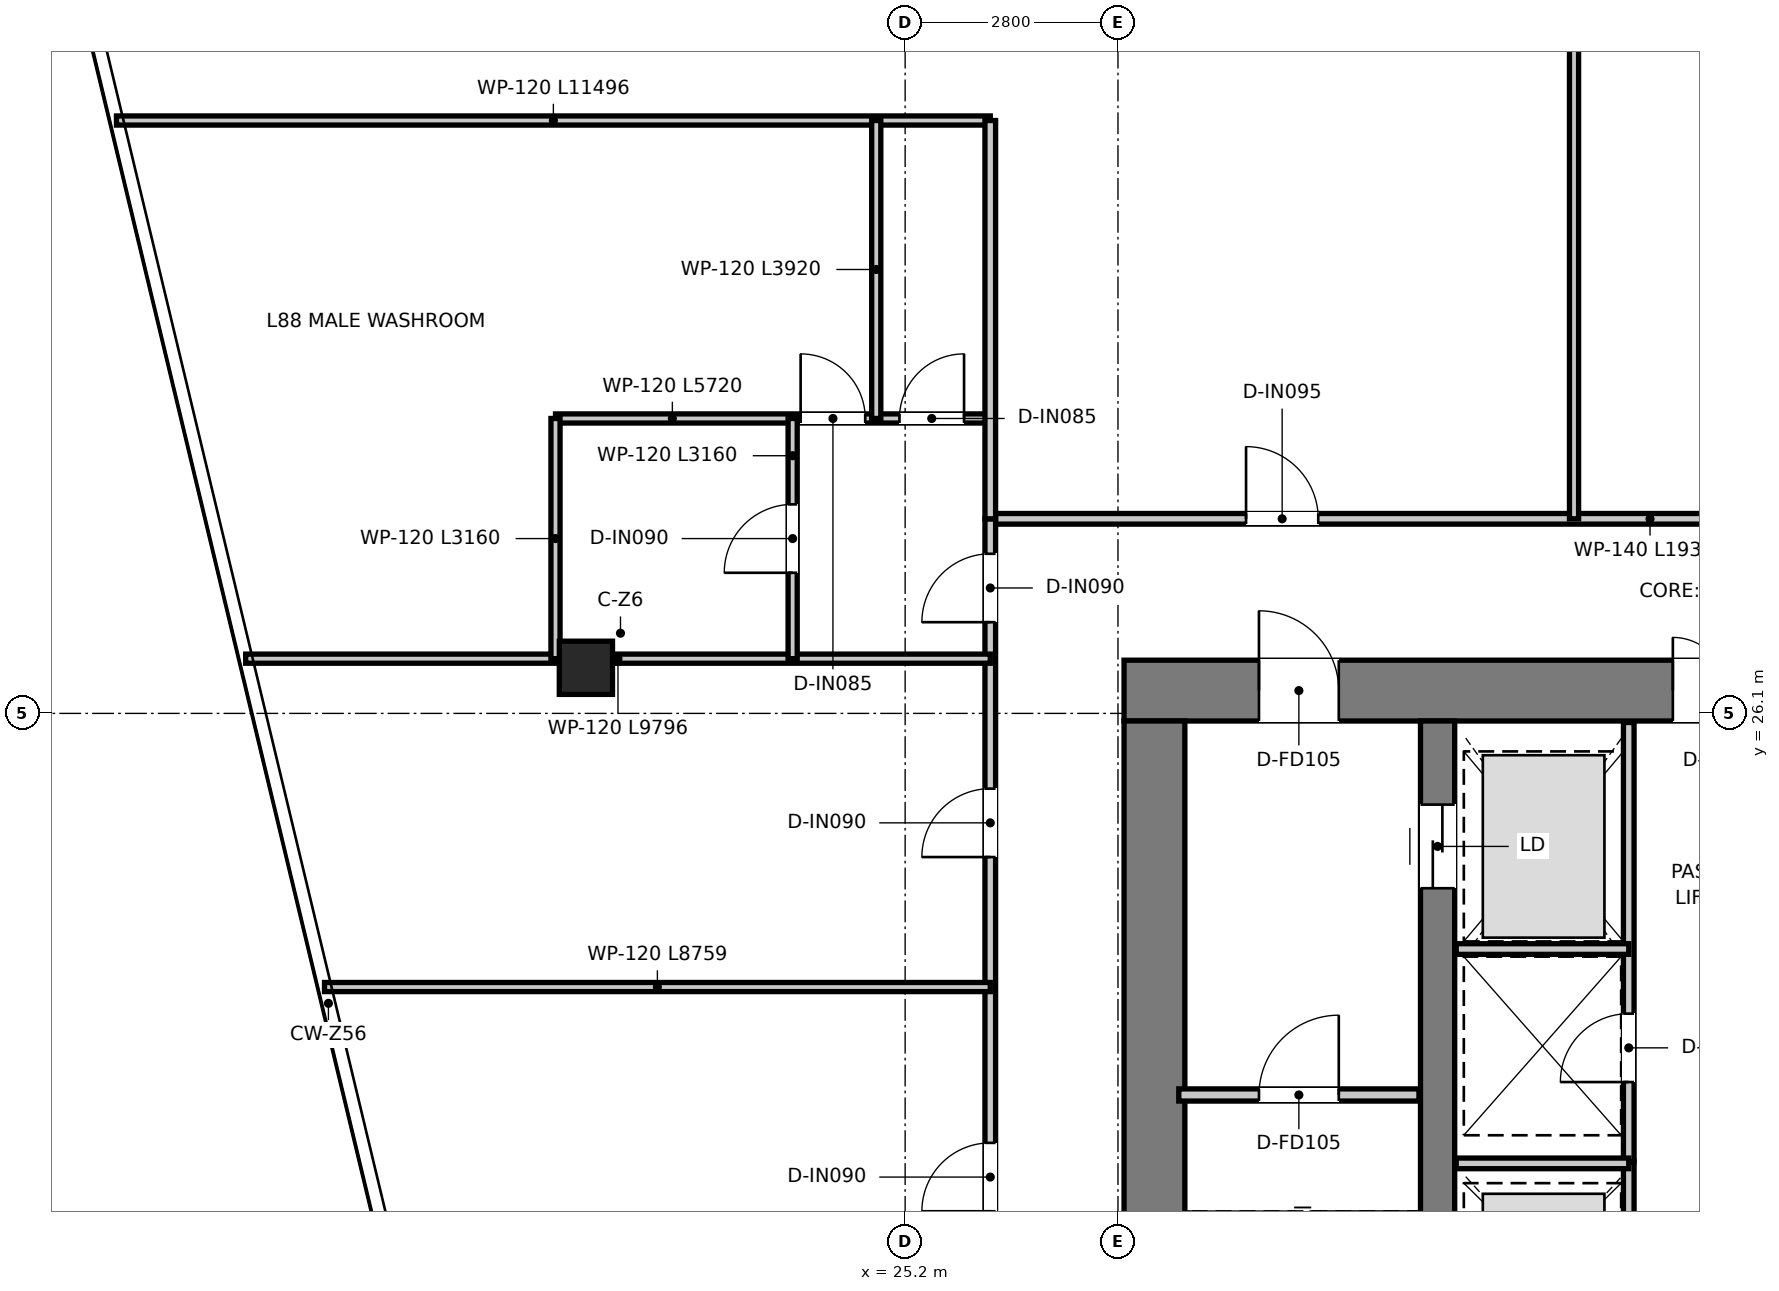
"""IFC4 building model, lengths in metres.
Left out: names, types, materials, properties, quantities, classifications, styles, units other than length and angle.
Written with IfcOpenShell. Run it as: python <this file> out.ifc"""

import sys

from ifc_helpers import new_model, si_unit, direction, frame, frame_2d, origin, origin_2d, place, context, subcontext, project, spatial, rectangle, extrude, source, transform, mapped, element, fill, save


model = new_model("IFC4")
c1 = context("Model", 3, precision=1e-05, world=origin(), true_north=direction((0.0, 1.0)))
c2 = subcontext(c1, "Body", "Model", "MODEL_VIEW")
j1 = project(units=[si_unit("LENGTHUNIT", "METRE"), si_unit("PLANEANGLEUNIT", "RADIAN")], contexts=[c1])
p1 = place(None, origin())
s1 = spatial("IfcSite", under=j1, at=p1, CompositionType="ELEMENT")
p2 = place(p1, origin())
s2 = spatial("IfcBuilding", under=s1, at=p2, CompositionType="ELEMENT")
p3 = place(p2, frame((0.0, 0.0, 359.3)))
s3 = spatial("IfcBuildingStorey", under=s2, at=p3, CompositionType="ELEMENT", Elevation=359.3)
p4 = place(p3, frame((28.08, 26.4, 0.0), z_axis=(0.0, 0.0, 1.0), x_axis=(1.0, 0.0, 0.0)))
e1 = element("IfcWall", 1, at=p4, inside=s3, PredefinedType="SHEAR", context=c2, shape_type="SweptSolid", body=[
    extrude(rectangle(XDim=15.84, YDim=0.8, at=frame_2d((7.92, 0.0))), origin(), (0.0, 0.0, 1.0), 3.95),
])
p5 = place(p4, frame((7.22, 0.0, 0.0)))
e2 = element("IfcOpeningElement", 2, at=p5, cuts=e1, PredefinedType="OPENING", context=c2, shape_type="SweptSolid", body=[
    extrude(rectangle(XDim=1.4, YDim=2.2, at=frame_2d((0.7, 1.1))), frame((0.0, 0.41, 0.0), z_axis=(0.0, -1.0, 0.0), x_axis=(1.0, 0.0, 0.0)), (0.0, 0.0, 1.0), 0.82),
])
p6 = place(p4, frame((1.775, 0.0, 0.0)))
e3 = element("IfcOpeningElement", 3, at=p6, cuts=e1, PredefinedType="OPENING", context=c2, shape_type="SweptSolid", body=[
    extrude(rectangle(XDim=1.05, YDim=2.1, at=frame_2d((0.525, 1.05))), frame((0.0, 0.41, 0.0), z_axis=(0.0, -1.0, 0.0), x_axis=(1.0, 0.0, 0.0)), (0.0, 0.0, 1.0), 0.82),
])
p7 = place(p4, frame((13.015, 0.0, 0.0)))
e4 = element("IfcOpeningElement", 4, at=p7, cuts=e1, PredefinedType="OPENING", context=c2, shape_type="SweptSolid", body=[
    extrude(rectangle(XDim=1.05, YDim=2.1, at=frame_2d((0.525, 1.05))), frame((0.0, 0.41, 0.0), z_axis=(0.0, -1.0, 0.0), x_axis=(1.0, 0.0, 0.0)), (0.0, 0.0, 1.0), 0.82),
])
p8 = place(p3, frame((28.48, 11.3, 0.0), z_axis=(0.0, 0.0, 1.0), x_axis=(0.0, 1.0, 0.0)))
e5 = element("IfcWall", 5, at=p8, inside=s3, PredefinedType="SHEAR", context=c2, shape_type="SweptSolid", body=[
    extrude(rectangle(XDim=14.7, YDim=0.8, at=frame_2d((7.35, 0.0))), origin(), (0.0, 0.0, 1.0), 3.95),
])
p9 = place(p3, frame((32.205, 13.22, 0.0), z_axis=(0.0, 0.0, 1.0), x_axis=(0.0, 1.0, 0.0)))
e6 = element("IfcWall", 6, at=p9, inside=s3, PredefinedType="SHEAR", context=c2, shape_type="SweptSolid", body=[
    extrude(rectangle(XDim=12.78, YDim=0.45, at=frame_2d((6.39, 0.0))), origin(), (0.0, 0.0, 1.0), 3.95),
])
p10 = place(p9, frame((10.58, 0.0, 0.0)))
e7 = element("IfcOpeningElement", 7, at=p10, cuts=e6, PredefinedType="OPENING", context=c2, shape_type="SweptSolid", body=[
    extrude(rectangle(XDim=1.1, YDim=2.15, at=frame_2d((0.55, 1.075))), frame((0.0, 0.235, 0.0), z_axis=(0.0, -1.0, 0.0), x_axis=(1.0, 0.0, 0.0)), (0.0, 0.0, 1.0), 0.47),
])
m1 = source(origin(), c2, "Body", "SweptSolid", [
    extrude(rectangle(XDim=0.7, YDim=0.7, at=origin_2d()), origin(), (0.0, 0.0, 1.0), 3.95),
])
p11 = place(p3, frame((21.0, 26.7, 0.0), z_axis=(0.0, 0.0, 1.0), x_axis=(1.0, 0.0, 0.0)))
e8 = element("IfcColumn", 8, at=p11, inside=s3, PredefinedType="COLUMN", context=c2, shape_type="MappedRepresentation", body=[
    mapped(m1, transform((0.0, 0.0, 0.0), x_axis=(1.0, 0.0, 0.0), y_axis=(0.0, 1.0, 0.0), z_axis=(0.0, 0.0, 1.0), scale=1.0)),
])
p12 = place(p3, frame((28.8, 21.08, 0.0), z_axis=(0.0, 0.0, 1.0), x_axis=(1.0, 0.0, 0.0)))
e9 = element("IfcWall", 9, at=p12, inside=s3, PredefinedType="PARTITIONING", context=c2, shape_type="SweptSolid", body=[
    extrude(rectangle(XDim=3.16, YDim=0.16, at=frame_2d((1.58, 0.0))), origin(), (0.0, 0.0, 1.0), 3.6),
])
p13 = place(p12, frame((1.055, 0.0, 0.0)))
e10 = element("IfcOpeningElement", 10, at=p13, cuts=e9, PredefinedType="OPENING", context=c2, shape_type="SweptSolid", body=[
    extrude(rectangle(XDim=1.05, YDim=2.1, at=frame_2d((0.525, 1.05))), frame((0.0, 0.09, 0.0), z_axis=(0.0, -1.0, 0.0), x_axis=(1.0, 0.0, 0.0)), (0.0, 0.0, 1.0), 0.18),
])
p14 = place(p3, frame((34.72, 20.2, 0.0), z_axis=(0.0, 0.0, 1.0), x_axis=(0.0, 1.0, 0.0)))
e11 = element("IfcWall", 11, at=p14, inside=s3, PredefinedType="PARTITIONING", context=c2, shape_type="SweptSolid", body=[
    extrude(rectangle(XDim=5.78, YDim=0.14, at=frame_2d((2.89, 0.0))), origin(), (0.0, 0.0, 1.0), 2.75),
])
p15 = place(p14, frame((1.05, 0.0, 0.0)))
e12 = element("IfcOpeningElement", 12, at=p15, cuts=e11, PredefinedType="OPENING", context=c2, shape_type="SweptSolid", body=[
    extrude(rectangle(XDim=0.9, YDim=2.1, at=frame_2d((0.45, 1.05))), frame((0.0, 0.08, 0.0), z_axis=(0.0, -1.0, 0.0), x_axis=(1.0, 0.0, 0.0)), (0.0, 0.0, 1.0), 0.16),
])
p16 = place(p3, frame((32.45, 23.0, 0.0), z_axis=(0.0, 0.0, 1.0), x_axis=(1.0, 0.0, 0.0)))
e13 = element("IfcWall", 13, at=p16, inside=s3, PredefinedType="PARTITIONING", context=c2, shape_type="SweptSolid", body=[
    extrude(rectangle(XDim=2.27, YDim=0.14, at=frame_2d((1.135, 0.0))), origin(), (0.0, 0.0, 1.0), 2.75),
])
p17 = place(p3, frame((34.72, 17.78, 0.0), z_axis=(0.0, 0.0, 1.0), x_axis=(0.0, 1.0, 0.0)))
e14 = element("IfcWall", 14, at=p17, inside=s3, PredefinedType="PARTITIONING", context=c2, shape_type="SweptSolid", body=[
    extrude(rectangle(XDim=2.42, YDim=0.14, at=frame_2d((1.21, 0.0))), origin(), (0.0, 0.0, 1.0), 3.6),
])
p18 = place(p17, frame((0.55, 0.0, 0.0)))
e15 = element("IfcOpeningElement", 15, at=p18, cuts=e14, PredefinedType="OPENING", context=c2, shape_type="SweptSolid", body=[
    extrude(rectangle(XDim=1.1, YDim=2.15, at=frame_2d((0.55, 1.075))), frame((0.0, 0.08, 0.0), z_axis=(0.0, -1.0, 0.0), x_axis=(1.0, 0.0, 0.0)), (0.0, 0.0, 1.0), 0.16),
])
p19 = place(p3, frame((32.45, 20.18, 0.0), z_axis=(0.0, 0.0, 1.0), x_axis=(1.0, 0.0, 0.0)))
e16 = element("IfcWall", 16, at=p19, inside=s3, PredefinedType="PARTITIONING", context=c2, shape_type="SweptSolid", body=[
    extrude(rectangle(XDim=2.27, YDim=0.14, at=frame_2d((1.135, 0.0))), origin(), (0.0, 0.0, 1.0), 3.6),
])
p20 = place(p3, frame((26.32, 28.66, 0.0), z_axis=(0.0, 0.0, 1.0), x_axis=(1.0, 0.0, 0.0)))
e17 = element("IfcWall", 17, at=p20, inside=s3, PredefinedType="PARTITIONING", context=c2, shape_type="SweptSolid", body=[
    extrude(rectangle(XDim=19.36, YDim=0.14, at=frame_2d((9.68, 0.0))), origin(), (0.0, 0.0, 1.0), 3.11),
])
p21 = place(p20, frame((3.365, 0.0, 0.0)))
e18 = element("IfcOpeningElement", 18, at=p21, cuts=e17, PredefinedType="OPENING", context=c2, shape_type="SweptSolid", body=[
    extrude(rectangle(XDim=0.95, YDim=2.1, at=frame_2d((0.475, 1.05))), frame((0.0, 0.08, 0.0), z_axis=(0.0, -1.0, 0.0), x_axis=(1.0, 0.0, 0.0)), (0.0, 0.0, 1.0), 0.16),
])
p22 = place(p20, frame((13.045, 0.0, 0.0)))
e19 = element("IfcOpeningElement", 19, at=p22, cuts=e17, PredefinedType="OPENING", context=c2, shape_type="SweptSolid", body=[
    extrude(rectangle(XDim=0.95, YDim=2.1, at=frame_2d((0.475, 1.05))), frame((0.0, 0.08, 0.0), z_axis=(0.0, -1.0, 0.0), x_axis=(1.0, 0.0, 0.0)), (0.0, 0.0, 1.0), 0.16),
])
p23 = place(p3, frame((26.32, 13.0, 0.0), z_axis=(0.0, 0.0, 1.0), x_axis=(0.0, 1.0, 0.0)))
e20 = element("IfcWall", 20, at=p23, inside=s3, PredefinedType="PARTITIONING", context=c2, shape_type="SweptSolid", body=[
    extrude(rectangle(XDim=15.66, YDim=0.14, at=frame_2d((7.83, 0.0))), origin(), (0.0, 0.0, 1.0), 3.06),
])
p24 = place(p23, frame((14.3, 0.0, 0.0)))
e21 = element("IfcOpeningElement", 21, at=p24, cuts=e20, PredefinedType="OPENING", context=c2, shape_type="SweptSolid", body=[
    extrude(rectangle(XDim=0.9, YDim=2.1, at=frame_2d((0.45, 1.05))), frame((0.0, 0.08, 0.0), z_axis=(0.0, -1.0, 0.0), x_axis=(1.0, 0.0, 0.0)), (0.0, 0.0, 1.0), 0.16),
])
p25 = place(p23, frame((6.55, 0.0, 0.0)))
e22 = element("IfcOpeningElement", 22, at=p25, cuts=e20, PredefinedType="OPENING", context=c2, shape_type="SweptSolid", body=[
    extrude(rectangle(XDim=0.9, YDim=2.1, at=frame_2d((0.45, 1.05))), frame((0.0, 0.08, 0.0), z_axis=(0.0, -1.0, 0.0), x_axis=(1.0, 0.0, 0.0)), (0.0, 0.0, 1.0), 0.16),
])
p26 = place(p23, frame((11.21, 0.0, 0.0)))
e23 = element("IfcOpeningElement", 23, at=p26, cuts=e20, PredefinedType="OPENING", context=c2, shape_type="SweptSolid", body=[
    extrude(rectangle(XDim=0.9, YDim=2.1, at=frame_2d((0.45, 1.05))), frame((0.0, 0.08, 0.0), z_axis=(0.0, -1.0, 0.0), x_axis=(1.0, 0.0, 0.0)), (0.0, 0.0, 1.0), 0.16),
])
p27 = place(p3, frame((16.524, 26.82, 0.0), z_axis=(0.0, 0.0, 1.0), x_axis=(1.0, 0.0, 0.0)))
e24 = element("IfcWall", 24, at=p27, inside=s3, PredefinedType="PARTITIONING", context=c2, shape_type="SweptSolid", body=[
    extrude(rectangle(XDim=9.796, YDim=0.12, at=frame_2d((4.898, 0.0))), origin(), (0.0, 0.0, 1.0), 3.06),
])
p28 = place(p3, frame((14.824, 33.9, 0.0), z_axis=(0.0, 0.0, 1.0), x_axis=(1.0, 0.0, 0.0)))
e25 = element("IfcWall", 25, at=p28, inside=s3, PredefinedType="PARTITIONING", context=c2, shape_type="SweptSolid", body=[
    extrude(rectangle(XDim=11.496, YDim=0.12, at=frame_2d((5.748, 0.0))), origin(), (0.0, 0.0, 1.0), 3.06),
])
p29 = place(p3, frame((20.6, 29.98, 0.0), z_axis=(0.0, 0.0, 1.0), x_axis=(1.0, 0.0, 0.0)))
e26 = element("IfcWall", 26, at=p29, inside=s3, PredefinedType="PARTITIONING", context=c2, shape_type="SweptSolid", body=[
    extrude(rectangle(XDim=5.72, YDim=0.12, at=frame_2d((2.86, 0.0))), origin(), (0.0, 0.0, 1.0), 3.06),
])
p30 = place(p29, frame((3.225, 0.0, 0.0)))
e27 = element("IfcOpeningElement", 27, at=p30, cuts=e26, PredefinedType="OPENING", context=c2, shape_type="SweptSolid", body=[
    extrude(rectangle(XDim=0.85, YDim=2.1, at=frame_2d((0.425, 1.05))), frame((0.0, 0.07, 0.0), z_axis=(0.0, -1.0, 0.0), x_axis=(1.0, 0.0, 0.0)), (0.0, 0.0, 1.0), 0.14),
])
p31 = place(p29, frame((4.525, 0.0, 0.0)))
e28 = element("IfcOpeningElement", 28, at=p31, cuts=e26, PredefinedType="OPENING", context=c2, shape_type="SweptSolid", body=[
    extrude(rectangle(XDim=0.85, YDim=2.1, at=frame_2d((0.425, 1.05))), frame((0.0, 0.07, 0.0), z_axis=(0.0, -1.0, 0.0), x_axis=(1.0, 0.0, 0.0)), (0.0, 0.0, 1.0), 0.14),
])
p32 = place(p3, frame((20.6, 26.82, 0.0), z_axis=(0.0, 0.0, 1.0), x_axis=(0.0, 1.0, 0.0)))
e29 = element("IfcWall", 29, at=p32, inside=s3, PredefinedType="PARTITIONING", context=c2, shape_type="SweptSolid", body=[
    extrude(rectangle(XDim=3.16, YDim=0.12, at=frame_2d((1.58, 0.0))), origin(), (0.0, 0.0, 1.0), 3.6),
])
p33 = place(p3, frame((23.72, 26.82, 0.0), z_axis=(0.0, 0.0, 1.0), x_axis=(0.0, 1.0, 0.0)))
e30 = element("IfcWall", 30, at=p33, inside=s3, PredefinedType="PARTITIONING", context=c2, shape_type="SweptSolid", body=[
    extrude(rectangle(XDim=3.16, YDim=0.12, at=frame_2d((1.58, 0.0))), origin(), (0.0, 0.0, 1.0), 3.11),
])
p34 = place(p33, frame((1.13, 0.0, 0.0)))
e31 = element("IfcOpeningElement", 31, at=p34, cuts=e30, PredefinedType="OPENING", context=c2, shape_type="SweptSolid", body=[
    extrude(rectangle(XDim=0.9, YDim=2.1, at=frame_2d((0.45, 1.05))), frame((0.0, 0.07, 0.0), z_axis=(0.0, -1.0, 0.0), x_axis=(1.0, 0.0, 0.0)), (0.0, 0.0, 1.0), 0.14),
])
p35 = place(p3, frame((24.82, 29.98, 0.0), z_axis=(0.0, 0.0, 1.0), x_axis=(0.0, 1.0, 0.0)))
e32 = element("IfcWall", 32, at=p35, inside=s3, PredefinedType="PARTITIONING", context=c2, shape_type="SweptSolid", body=[
    extrude(rectangle(XDim=3.92, YDim=0.12, at=frame_2d((1.96, 0.0))), origin(), (0.0, 0.0, 1.0), 3.3),
])
p36 = place(p3, frame((26.32, 28.66, 0.0), z_axis=(0.0, 0.0, 1.0), x_axis=(0.0, 1.0, 0.0)))
e33 = element("IfcWall", 33, at=p36, inside=s3, PredefinedType="PARTITIONING", context=c2, shape_type="SweptSolid", body=[
    extrude(rectangle(XDim=5.24, YDim=0.14, at=frame_2d((2.62, 0.0))), origin(), (0.0, 0.0, 1.0), 3.36),
])
p37 = place(p3, frame((34.0, 28.66, 0.0), z_axis=(0.0, 0.0, 1.0), x_axis=(0.0, 1.0, 0.0)))
e34 = element("IfcWall", 34, at=p37, inside=s3, PredefinedType="PARTITIONING", context=c2, shape_type="SweptSolid", body=[
    extrude(rectangle(XDim=17.007, YDim=0.12, at=frame_2d((8.504, 0.0))), origin(), (0.0, 0.0, 1.0), 3.06),
])
p38 = place(p3, frame((17.561, 22.5, 0.0), z_axis=(0.0, 0.0, 1.0), x_axis=(1.0, 0.0, 0.0)))
e35 = element("IfcWall", 35, at=p38, inside=s3, PredefinedType="PARTITIONING", context=c2, shape_type="SweptSolid", body=[
    extrude(rectangle(XDim=8.759, YDim=0.12, at=frame_2d((4.379, 0.0))), origin(), (0.0, 0.0, 1.0), 3.06),
])
p39 = place(p13, origin())
e36 = element("IfcDoor", 36, at=p39, inside=s3, OperationType="SINGLE_SWING_RIGHT", PredefinedType="DOOR", context=c2, shape_type="SweptSolid", body=[
    extrude(rectangle(XDim=1.05, YDim=2.1, at=frame_2d((0.525, 1.05))), frame((0.0, 0.025, 0.0), z_axis=(0.0, -1.0, 0.0), x_axis=(1.0, 0.0, 0.0)), (0.0, 0.0, 1.0), 0.05),
])
fill(e10, e36)
p40 = place(p5, origin())
e37 = element("IfcDoor", 37, at=p40, inside=s3, OperationType="DOUBLE_DOOR_SINGLE_SWING", PredefinedType="DOOR", context=c2, shape_type="SweptSolid", body=[
    extrude(rectangle(XDim=1.4, YDim=2.2, at=frame_2d((0.7, 1.1))), frame((0.0, 0.025, 0.0), z_axis=(0.0, -1.0, 0.0), x_axis=(1.0, 0.0, 0.0)), (0.0, 0.0, 1.0), 0.05),
])
fill(e2, e37)
p41 = place(p6, origin())
e38 = element("IfcDoor", 38, at=p41, inside=s3, OperationType="SINGLE_SWING_LEFT", PredefinedType="DOOR", context=c2, shape_type="SweptSolid", body=[
    extrude(rectangle(XDim=1.05, YDim=2.1, at=frame_2d((0.525, 1.05))), frame((0.0, 0.025, 0.0), z_axis=(0.0, -1.0, 0.0), x_axis=(1.0, 0.0, 0.0)), (0.0, 0.0, 1.0), 0.05),
])
fill(e3, e38)
p42 = place(p10, origin())
e39 = element("IfcDoor", 39, at=p42, inside=s3, OperationType="DOUBLE_DOOR_SLIDING", PredefinedType="DOOR", context=c2, shape_type="SweptSolid", body=[
    extrude(rectangle(XDim=1.1, YDim=2.15, at=frame_2d((0.55, 1.075))), frame((0.0, 0.025, 0.0), z_axis=(0.0, -1.0, 0.0), x_axis=(1.0, 0.0, 0.0)), (0.0, 0.0, 1.0), 0.05),
])
fill(e7, e39)
p43 = place(p15, origin())
e40 = element("IfcDoor", 40, at=p43, inside=s3, OperationType="SINGLE_SWING_LEFT", PredefinedType="DOOR", context=c2, shape_type="SweptSolid", body=[
    extrude(rectangle(XDim=0.9, YDim=2.1, at=frame_2d((0.45, 1.05))), frame((0.0, 0.025, 0.0), z_axis=(0.0, -1.0, 0.0), x_axis=(1.0, 0.0, 0.0)), (0.0, 0.0, 1.0), 0.05),
])
fill(e12, e40)
p44 = place(p24, origin())
e41 = element("IfcDoor", 41, at=p44, inside=s3, OperationType="SINGLE_SWING_LEFT", PredefinedType="DOOR", context=c2, shape_type="SweptSolid", body=[
    extrude(rectangle(XDim=0.9, YDim=2.1, at=frame_2d((0.45, 1.05))), frame((0.0, 0.025, 0.0), z_axis=(0.0, -1.0, 0.0), x_axis=(1.0, 0.0, 0.0)), (0.0, 0.0, 1.0), 0.05),
])
fill(e21, e41)
p45 = place(p30, origin())
e42 = element("IfcDoor", 42, at=p45, inside=s3, OperationType="SINGLE_SWING_LEFT", PredefinedType="DOOR", context=c2, shape_type="SweptSolid", body=[
    extrude(rectangle(XDim=0.85, YDim=2.1, at=frame_2d((0.425, 1.05))), frame((0.0, 0.025, 0.0), z_axis=(0.0, -1.0, 0.0), x_axis=(1.0, 0.0, 0.0)), (0.0, 0.0, 1.0), 0.05),
])
fill(e27, e42)
p46 = place(p31, origin())
e43 = element("IfcDoor", 43, at=p46, inside=s3, OperationType="SINGLE_SWING_RIGHT", PredefinedType="DOOR", context=c2, shape_type="SweptSolid", body=[
    extrude(rectangle(XDim=0.85, YDim=2.1, at=frame_2d((0.425, 1.05))), frame((0.0, 0.025, 0.0), z_axis=(0.0, -1.0, 0.0), x_axis=(1.0, 0.0, 0.0)), (0.0, 0.0, 1.0), 0.05),
])
fill(e28, e43)
p47 = place(p34, origin())
e44 = element("IfcDoor", 44, at=p47, inside=s3, OperationType="SINGLE_SWING_LEFT", PredefinedType="DOOR", context=c2, shape_type="SweptSolid", body=[
    extrude(rectangle(XDim=0.9, YDim=2.1, at=frame_2d((0.45, 1.05))), frame((0.0, 0.025, 0.0), z_axis=(0.0, -1.0, 0.0), x_axis=(1.0, 0.0, 0.0)), (0.0, 0.0, 1.0), 0.05),
])
fill(e31, e44)
p48 = place(p21, origin())
e45 = element("IfcDoor", 45, at=p48, inside=s3, OperationType="SINGLE_SWING_LEFT", PredefinedType="DOOR", context=c2, shape_type="SweptSolid", body=[
    extrude(rectangle(XDim=0.95, YDim=2.1, at=frame_2d((0.475, 1.05))), frame((0.0, 0.025, 0.0), z_axis=(0.0, -1.0, 0.0), x_axis=(1.0, 0.0, 0.0)), (0.0, 0.0, 1.0), 0.05),
])
fill(e18, e45)
p49 = place(p25, origin())
e46 = element("IfcDoor", 46, at=p49, inside=s3, OperationType="SINGLE_SWING_LEFT", PredefinedType="DOOR", context=c2, shape_type="SweptSolid", body=[
    extrude(rectangle(XDim=0.9, YDim=2.1, at=frame_2d((0.45, 1.05))), frame((0.0, 0.025, 0.0), z_axis=(0.0, -1.0, 0.0), x_axis=(1.0, 0.0, 0.0)), (0.0, 0.0, 1.0), 0.05),
])
fill(e22, e46)
p50 = place(p26, origin())
e47 = element("IfcDoor", 47, at=p50, inside=s3, OperationType="SINGLE_SWING_LEFT", PredefinedType="DOOR", context=c2, shape_type="SweptSolid", body=[
    extrude(rectangle(XDim=0.9, YDim=2.1, at=frame_2d((0.45, 1.05))), frame((0.0, 0.025, 0.0), z_axis=(0.0, -1.0, 0.0), x_axis=(1.0, 0.0, 0.0)), (0.0, 0.0, 1.0), 0.05),
])
fill(e23, e47)
save(model, sys.argv[1])
